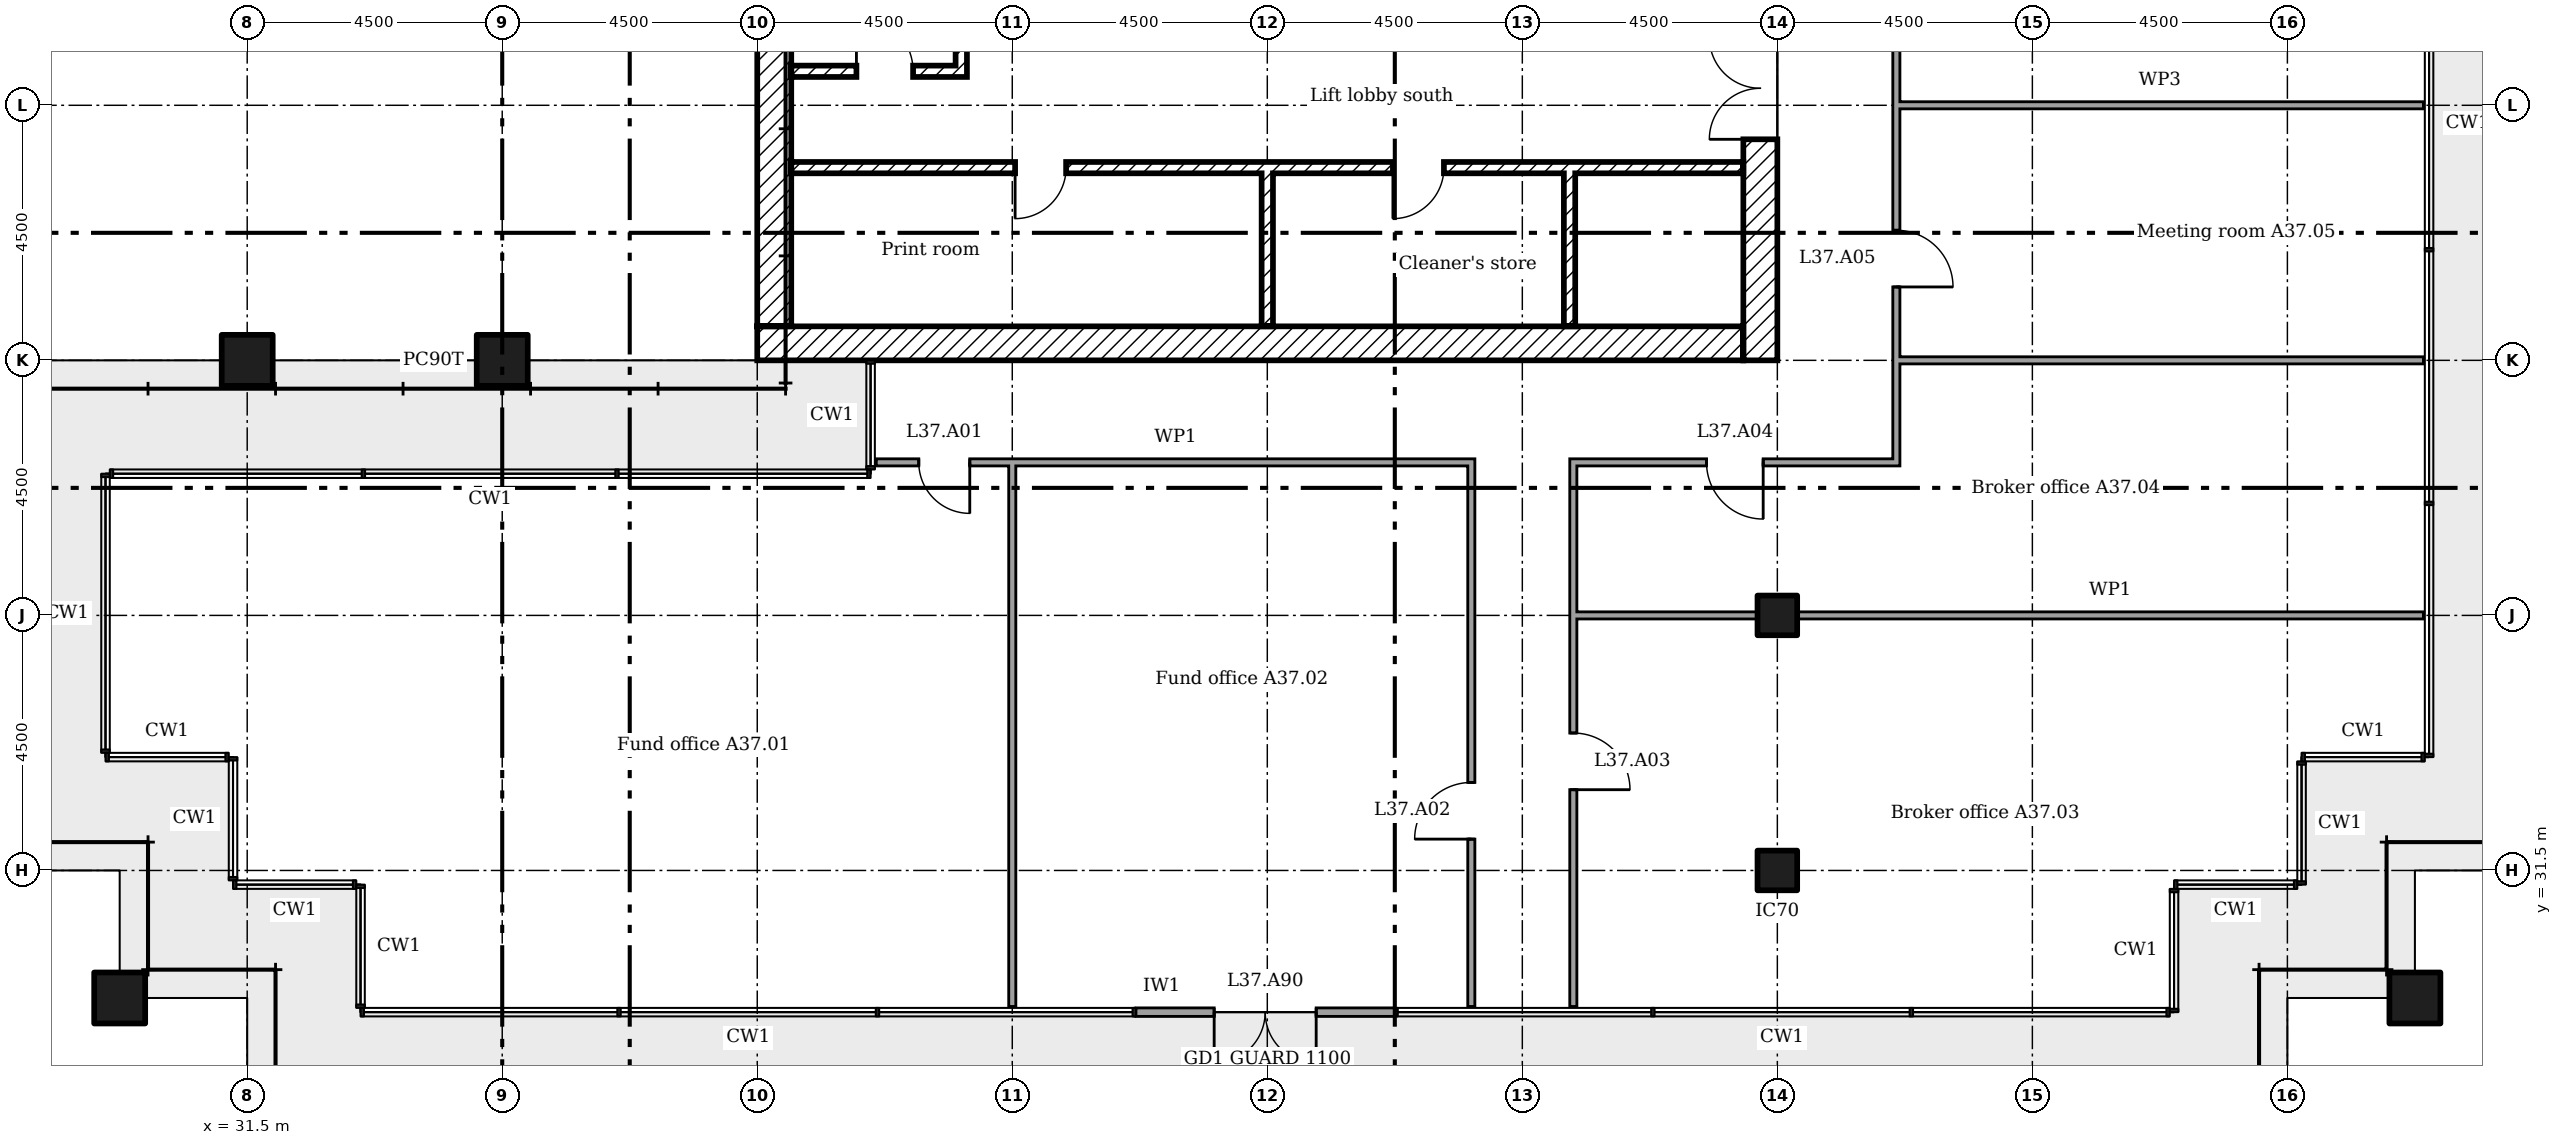
"""IFC4 building model, lengths in metres.
Left out: names, types, materials, properties, quantities, classifications, styles, units other than length and angle.
Written with IfcOpenShell. Run it as: python <this file> out.ifc"""

import sys

from ifc_helpers import new_model, si_unit, direction, frame, frame_2d, origin, origin_2d, place, context, subcontext, project, spatial, rectangle, extrude, element, fill, save


model = new_model("IFC4")
c1 = context("Model", 3, precision=1e-05, world=origin(), true_north=direction((0.0, 1.0)))
c2 = subcontext(c1, "Body", "Model", "MODEL_VIEW")
j1 = project(units=[si_unit("LENGTHUNIT", "METRE"), si_unit("PLANEANGLEUNIT", "RADIAN")], contexts=[c1])
p1 = place(None, origin())
s1 = spatial("IfcSite", under=j1, at=p1, CompositionType="ELEMENT")
p2 = place(p1, origin())
s2 = spatial("IfcBuilding", under=s1, at=p2, CompositionType="ELEMENT")
p3 = place(p2, frame((0.0, 0.0, 151.0)))
s3 = spatial("IfcBuildingStorey", under=s2, at=p3, CompositionType="ELEMENT", Elevation=151.0)
for number, where in (
    (1, (69.75, 29.25, 0.0)),
    (2, (36.0, 40.5, 0.0)),
    (3, (31.5, 40.5, 0.0)),
    (4, (29.25, 29.25, 0.0)),
):
    element("IfcColumn", number, at=place(p3, frame(where)), inside=s3, PredefinedType="COLUMN", context=c2, shape_type="SweptSolid", body=[
        extrude(rectangle(XDim=0.9, YDim=0.9, at=origin_2d()), origin(), (0.0, 0.0, 1.0), 3.6),
    ])
for number, where in (
    (5, (58.5, 31.5, 0.0)),
    (6, (58.5, 36.0, 0.0)),
):
    element("IfcColumn", number, at=place(p3, frame(where)), inside=s3, PredefinedType="COLUMN", context=c2, shape_type="SweptSolid", body=[
        extrude(rectangle(XDim=0.7, YDim=0.7, at=origin_2d()), origin(), (0.0, 0.0, 1.0), 3.6),
    ])
p4 = place(p3, frame((47.182, 29.0, 0.0)))
e7 = element("IfcWall", 7, at=p4, inside=s3, PredefinedType="SOLIDWALL", context=c2, shape_type="SweptSolid", body=[
    extrude(rectangle(XDim=4.561, YDim=0.15, at=frame_2d((2.28, 0.0))), origin(), (0.0, 0.0, 1.0), 3.45),
])
p5 = place(p4, frame((1.38, 0.0, 0.0)))
e8 = element("IfcOpeningElement", 8, at=p5, cuts=e7, PredefinedType="OPENING", context=c2, shape_type="SweptSolid", body=[
    extrude(rectangle(XDim=1.8, YDim=2.4, at=frame_2d((0.9, 1.2))), frame((0.0, 0.085, 0.0), z_axis=(0.0, -1.0, 0.0), x_axis=(1.0, 0.0, 0.0)), (0.0, 0.0, 1.0), 0.17),
])
p6 = place(p3, frame((58.2, 40.5, 0.0), z_axis=(0.0, 0.0, 1.0), x_axis=(0.0, 1.0, 0.0)))
e9 = element("IfcWall", 9, at=p6, inside=s3, PredefinedType="SHEAR", context=c2, shape_type="SweptSolid", body=[
    extrude(rectangle(XDim=18.0, YDim=0.6, at=frame_2d((9.0, 0.0))), origin(), (0.0, 0.0, 1.0), 3.35),
])
p7 = place(p6, frame((13.15, 0.0, 0.0)))
e10 = element("IfcOpeningElement", 10, at=p7, cuts=e9, PredefinedType="OPENING", context=c2, shape_type="SweptSolid", body=[
    extrude(rectangle(XDim=1.2, YDim=2.1, at=frame_2d((0.6, 1.05))), frame((0.0, 0.31, 0.0), z_axis=(0.0, -1.0, 0.0), x_axis=(1.0, 0.0, 0.0)), (0.0, 0.0, 1.0), 0.62),
])
p8 = place(p6, frame((3.9, 0.0, 0.0)))
e11 = element("IfcOpeningElement", 11, at=p8, cuts=e9, PredefinedType="OPENING", context=c2, shape_type="SweptSolid", body=[
    extrude(rectangle(XDim=1.8, YDim=2.1, at=frame_2d((0.9, 1.05))), frame((0.0, 0.31, 0.0), z_axis=(0.0, -1.0, 0.0), x_axis=(1.0, 0.0, 0.0)), (0.0, 0.0, 1.0), 0.62),
])
p9 = place(p6, frame((11.525, 0.0, 0.0)))
e12 = element("IfcOpeningElement", 12, at=p9, cuts=e9, PredefinedType="OPENING", context=c2, shape_type="SweptSolid", body=[
    extrude(rectangle(XDim=1.0, YDim=2.1, at=frame_2d((0.5, 1.05))), frame((0.0, 0.31, 0.0), z_axis=(0.0, -1.0, 0.0), x_axis=(1.0, 0.0, 0.0)), (0.0, 0.0, 1.0), 0.62),
])
p10 = place(p3, frame((40.5, 40.8, 0.0)))
e13 = element("IfcWall", 13, at=p10, inside=s3, PredefinedType="SHEAR", context=c2, shape_type="SweptSolid", body=[
    extrude(rectangle(XDim=17.4, YDim=0.6, at=frame_2d((8.7, 0.0))), origin(), (0.0, 0.0, 1.0), 3.35),
])
p11 = place(p3, frame((40.8, 41.1, 0.0), z_axis=(0.0, 0.0, 1.0), x_axis=(0.0, 1.0, 0.0)))
e14 = element("IfcWall", 14, at=p11, inside=s3, PredefinedType="SHEAR", context=c2, shape_type="SweptSolid", body=[
    extrude(rectangle(XDim=16.8, YDim=0.6, at=frame_2d((8.4, 0.0))), origin(), (0.0, 0.0, 1.0), 3.35),
])
for number, where, z_axis, x_axis in (
    (15, (49.5, 41.1, 0.0), (0.0, 0.0, 1.0), (0.0, 1.0, 0.0)),
    (16, (54.833, 41.1, 0.0), (0.0, 0.0, 1.0), (0.0, 1.0, 0.0)),
):
    element("IfcWall", number, at=place(p3, frame(where, z_axis=z_axis, x_axis=x_axis)), inside=s3, PredefinedType="SHEAR", context=c2, shape_type="SweptSolid", body=[
        extrude(rectangle(XDim=2.7, YDim=0.2, at=frame_2d((1.35, 0.0))), origin(), (0.0, 0.0, 1.0), 3.35),
    ])
p12 = place(p3, frame((41.1, 43.9, 0.0)))
e17 = element("IfcWall", 17, at=p12, inside=s3, PredefinedType="SHEAR", context=c2, shape_type="SweptSolid", body=[
    extrude(rectangle(XDim=16.8, YDim=0.2, at=frame_2d((8.4, 0.0))), origin(), (0.0, 0.0, 1.0), 3.35),
])
p13 = place(p12, frame((3.95, 0.0, 0.0)))
e18 = element("IfcOpeningElement", 18, at=p13, cuts=e17, PredefinedType="OPENING", context=c2, shape_type="SweptSolid", body=[
    extrude(rectangle(XDim=0.9, YDim=2.1, at=frame_2d((0.45, 1.05))), frame((0.0, 0.11, 0.0), z_axis=(0.0, -1.0, 0.0), x_axis=(1.0, 0.0, 0.0)), (0.0, 0.0, 1.0), 0.22),
])
p14 = place(p12, frame((10.617, 0.0, 0.0)))
e19 = element("IfcOpeningElement", 19, at=p14, cuts=e17, PredefinedType="OPENING", context=c2, shape_type="SweptSolid", body=[
    extrude(rectangle(XDim=0.9, YDim=2.1, at=frame_2d((0.45, 1.05))), frame((0.0, 0.11, 0.0), z_axis=(0.0, -1.0, 0.0), x_axis=(1.0, 0.0, 0.0)), (0.0, 0.0, 1.0), 0.22),
])
p15 = place(p3, frame((44.1, 45.5, 0.0), z_axis=(0.0, 0.0, 1.0), x_axis=(0.0, 1.0, 0.0)))
e20 = element("IfcWall", 20, at=p15, inside=s3, PredefinedType="SHEAR", context=c2, shape_type="SweptSolid", body=[
    extrude(rectangle(XDim=6.9, YDim=0.2, at=frame_2d((3.45, 0.0))), origin(), (0.0, 0.0, 1.0), 3.35),
])
p16 = place(p3, frame((41.1, 45.6, 0.0)))
e21 = element("IfcWall", 21, at=p16, inside=s3, PredefinedType="SHEAR", context=c2, shape_type="SweptSolid", body=[
    extrude(rectangle(XDim=2.9, YDim=0.2, at=frame_2d((1.45, 0.0))), origin(), (0.0, 0.0, 1.0), 3.35),
])
p17 = place(p16, frame((1.15, 0.0, 0.0)))
e22 = element("IfcOpeningElement", 22, at=p17, cuts=e21, PredefinedType="OPENING", context=c2, shape_type="SweptSolid", body=[
    extrude(rectangle(XDim=1.0, YDim=2.1, at=frame_2d((0.5, 1.05))), frame((0.0, 0.11, 0.0), z_axis=(0.0, -1.0, 0.0), x_axis=(1.0, 0.0, 0.0)), (0.0, 0.0, 1.0), 0.22),
])
p18 = place(p3, frame((54.9, 36.0, 0.0)))
e23 = element("IfcWall", 23, at=p18, inside=s3, PredefinedType="PARTITIONING", context=c2, shape_type="SweptSolid", body=[
    extrude(rectangle(XDim=3.25, YDim=0.125, at=frame_2d((1.625, 0.0))), origin(), (0.0, 0.0, 1.0), 3.45),
])
p19 = place(p3, frame((58.85, 36.0, 0.0)))
e24 = element("IfcWall", 24, at=p19, inside=s3, PredefinedType="PARTITIONING", context=c2, shape_type="SweptSolid", body=[
    extrude(rectangle(XDim=11.05, YDim=0.125, at=frame_2d((5.525, 0.0))), origin(), (0.0, 0.0, 1.0), 2.766),
])
p20 = place(p3, frame((42.6, 38.7, 0.0)))
e25 = element("IfcWall", 25, at=p20, inside=s3, PredefinedType="PARTITIONING", context=c2, shape_type="SweptSolid", body=[
    extrude(rectangle(XDim=10.562, YDim=0.125, at=frame_2d((5.281, 0.0))), origin(), (0.0, 0.0, 1.0), 3.45),
])
p21 = place(p20, frame((0.75, 0.0, 0.0)))
e26 = element("IfcOpeningElement", 26, at=p21, cuts=e25, PredefinedType="OPENING", context=c2, shape_type="SweptSolid", body=[
    extrude(rectangle(XDim=0.9, YDim=2.1, at=frame_2d((0.45, 1.05))), frame((0.0, 0.073, 0.0), z_axis=(0.0, -1.0, 0.0), x_axis=(1.0, 0.0, 0.0)), (0.0, 0.0, 1.0), 0.145),
])
p22 = place(p3, frame((54.837, 38.7, 0.0)))
e27 = element("IfcWall", 27, at=p22, inside=s3, PredefinedType="PARTITIONING", context=c2, shape_type="SweptSolid", body=[
    extrude(rectangle(XDim=5.825, YDim=0.125, at=frame_2d((2.913, 0.0))), origin(), (0.0, 0.0, 1.0), 3.45),
])
p23 = place(p22, frame((2.413, 0.0, 0.0)))
e28 = element("IfcOpeningElement", 28, at=p23, cuts=e27, PredefinedType="OPENING", context=c2, shape_type="SweptSolid", body=[
    extrude(rectangle(XDim=1.0, YDim=2.1, at=frame_2d((0.5, 1.05))), frame((0.0, 0.073, 0.0), z_axis=(0.0, -1.0, 0.0), x_axis=(1.0, 0.0, 0.0)), (0.0, 0.0, 1.0), 0.145),
])
p24 = place(p3, frame((60.6, 40.5, 0.0)))
e29 = element("IfcWall", 29, at=p24, inside=s3, PredefinedType="PARTITIONING", context=c2, shape_type="SweptSolid", body=[
    extrude(rectangle(XDim=9.3, YDim=0.125, at=frame_2d((4.65, 0.0))), origin(), (0.0, 0.0, 1.0), 2.766),
])
p25 = place(p3, frame((60.6, 45.0, 0.0)))
e30 = element("IfcWall", 30, at=p25, inside=s3, PredefinedType="MOVABLE", context=c2, shape_type="SweptSolid", body=[
    extrude(rectangle(XDim=9.3, YDim=0.125, at=frame_2d((4.65, 0.0))), origin(), (0.0, 0.0, 1.0), 2.766),
])
p26 = place(p3, frame((45.0, 29.1, 0.0), z_axis=(0.0, 0.0, 1.0), x_axis=(0.0, 1.0, 0.0)))
e31 = element("IfcWall", 31, at=p26, inside=s3, PredefinedType="PARTITIONING", context=c2, shape_type="SweptSolid", body=[
    extrude(rectangle(XDim=9.6, YDim=0.125, at=frame_2d((4.8, 0.0))), origin(), (0.0, 0.0, 1.0), 2.766),
])
p27 = place(p3, frame((53.1, 29.1, 0.0), z_axis=(0.0, 0.0, 1.0), x_axis=(0.0, 1.0, 0.0)))
e32 = element("IfcWall", 32, at=p27, inside=s3, PredefinedType="PARTITIONING", context=c2, shape_type="SweptSolid", body=[
    extrude(rectangle(XDim=9.537, YDim=0.125, at=frame_2d((4.769, 0.0))), origin(), (0.0, 0.0, 1.0), 3.45),
])
p28 = place(p27, frame((2.953, 0.0, 0.0)))
e33 = element("IfcOpeningElement", 33, at=p28, cuts=e32, PredefinedType="OPENING", context=c2, shape_type="SweptSolid", body=[
    extrude(rectangle(XDim=1.0, YDim=2.1, at=frame_2d((0.5, 1.05))), frame((0.0, 0.073, 0.0), z_axis=(0.0, -1.0, 0.0), x_axis=(1.0, 0.0, 0.0)), (0.0, 0.0, 1.0), 0.145),
])
p29 = place(p3, frame((54.9, 29.1, 0.0), z_axis=(0.0, 0.0, 1.0), x_axis=(0.0, 1.0, 0.0)))
e34 = element("IfcWall", 34, at=p29, inside=s3, PredefinedType="PARTITIONING", context=c2, shape_type="SweptSolid", body=[
    extrude(rectangle(XDim=9.537, YDim=0.125, at=frame_2d((4.769, 0.0))), origin(), (0.0, 0.0, 1.0), 3.45),
])
p30 = place(p29, frame((3.825, 0.0, 0.0)))
e35 = element("IfcOpeningElement", 35, at=p30, cuts=e34, PredefinedType="OPENING", context=c2, shape_type="SweptSolid", body=[
    extrude(rectangle(XDim=1.0, YDim=2.1, at=frame_2d((0.5, 1.05))), frame((0.0, 0.073, 0.0), z_axis=(0.0, -1.0, 0.0), x_axis=(1.0, 0.0, 0.0)), (0.0, 0.0, 1.0), 0.145),
])
p31 = place(p3, frame((60.6, 38.762, 0.0), z_axis=(0.0, 0.0, 1.0), x_axis=(0.0, 1.0, 0.0)))
e36 = element("IfcWall", 36, at=p31, inside=s3, PredefinedType="PARTITIONING", context=c2, shape_type="SweptSolid", body=[
    extrude(rectangle(XDim=22.075, YDim=0.125, at=frame_2d((11.038, 0.0))), origin(), (0.0, 0.0, 1.0), 3.45),
])
p32 = place(p31, frame((3.032, 0.0, 0.0)))
e37 = element("IfcOpeningElement", 37, at=p32, cuts=e36, PredefinedType="OPENING", context=c2, shape_type="SweptSolid", body=[
    extrude(rectangle(XDim=1.0, YDim=2.1, at=frame_2d((0.5, 1.05))), frame((0.0, 0.073, 0.0), z_axis=(0.0, -1.0, 0.0), x_axis=(1.0, 0.0, 0.0)), (0.0, 0.0, 1.0), 0.145),
])
p33 = place(p31, frame((8.442, 0.0, 0.0)))
e38 = element("IfcOpeningElement", 38, at=p33, cuts=e36, PredefinedType="OPENING", context=c2, shape_type="SweptSolid", body=[
    extrude(rectangle(XDim=1.0, YDim=2.1, at=frame_2d((0.5, 1.05))), frame((0.0, 0.073, 0.0), z_axis=(0.0, -1.0, 0.0), x_axis=(1.0, 0.0, 0.0)), (0.0, 0.0, 1.0), 0.145),
])
p34 = place(p31, frame((12.488, 0.0, 0.0)))
e39 = element("IfcOpeningElement", 39, at=p34, cuts=e36, PredefinedType="OPENING", context=c2, shape_type="SweptSolid", body=[
    extrude(rectangle(XDim=1.0, YDim=2.1, at=frame_2d((0.5, 1.05))), frame((0.0, 0.073, 0.0), z_axis=(0.0, -1.0, 0.0), x_axis=(1.0, 0.0, 0.0)), (0.0, 0.0, 1.0), 0.145),
])
p35 = place(p31, frame((16.532, 0.0, 0.0)))
e40 = element("IfcOpeningElement", 40, at=p35, cuts=e36, PredefinedType="OPENING", context=c2, shape_type="SweptSolid", body=[
    extrude(rectangle(XDim=1.0, YDim=2.1, at=frame_2d((0.5, 1.05))), frame((0.0, 0.073, 0.0), z_axis=(0.0, -1.0, 0.0), x_axis=(1.0, 0.0, 0.0)), (0.0, 0.0, 1.0), 0.145),
])
p36 = place(p31, frame((20.663, 0.0, 0.0)))
e41 = element("IfcOpeningElement", 41, at=p36, cuts=e36, PredefinedType="OPENING", context=c2, shape_type="SweptSolid", body=[
    extrude(rectangle(XDim=0.9, YDim=2.1, at=frame_2d((0.45, 1.05))), frame((0.0, 0.073, 0.0), z_axis=(0.0, -1.0, 0.0), x_axis=(1.0, 0.0, 0.0)), (0.0, 0.0, 1.0), 0.145),
])
p37 = place(p5, frame((1.8, 0.0, 0.0), x_axis=(-1.0, 0.0, 0.0)))
e42 = element("IfcDoor", 42, at=p37, inside=s3, OperationType="DOUBLE_DOOR_DOUBLE_SWING", PredefinedType="NOTDEFINED", context=c2, shape_type="SweptSolid", body=[
    extrude(rectangle(XDim=1.8, YDim=2.4, at=frame_2d((0.9, 1.2))), frame((0.0, 0.025, 0.0), z_axis=(0.0, -1.0, 0.0), x_axis=(1.0, 0.0, 0.0)), (0.0, 0.0, 1.0), 0.05),
])
fill(e8, e42)
p38 = place(p8, origin())
e43 = element("IfcDoor", 43, at=p38, inside=s3, OperationType="DOUBLE_DOOR_SINGLE_SWING", PredefinedType="DOOR", context=c2, shape_type="SweptSolid", body=[
    extrude(rectangle(XDim=1.8, YDim=2.1, at=frame_2d((0.9, 1.05))), frame((0.0, 0.025, 0.0), z_axis=(0.0, -1.0, 0.0), x_axis=(1.0, 0.0, 0.0)), (0.0, 0.0, 1.0), 0.05),
])
fill(e11, e43)
p39 = place(p17, origin())
e44 = element("IfcDoor", 44, at=p39, inside=s3, OperationType="SINGLE_SWING_RIGHT", PredefinedType="DOOR", context=c2, shape_type="SweptSolid", body=[
    extrude(rectangle(XDim=1.0, YDim=2.1, at=frame_2d((0.5, 1.05))), frame((0.0, 0.025, 0.0), z_axis=(0.0, -1.0, 0.0), x_axis=(1.0, 0.0, 0.0)), (0.0, 0.0, 1.0), 0.05),
])
fill(e22, e44)
p40 = place(p13, frame((0.9, 0.0, 0.0), x_axis=(-1.0, 0.0, 0.0)))
e45 = element("IfcDoor", 45, at=p40, inside=s3, OperationType="SINGLE_SWING_LEFT", PredefinedType="DOOR", context=c2, shape_type="SweptSolid", body=[
    extrude(rectangle(XDim=0.9, YDim=2.1, at=frame_2d((0.45, 1.05))), frame((0.0, 0.025, 0.0), z_axis=(0.0, -1.0, 0.0), x_axis=(1.0, 0.0, 0.0)), (0.0, 0.0, 1.0), 0.05),
])
fill(e18, e45)
p41 = place(p14, frame((0.9, 0.0, 0.0), x_axis=(-1.0, 0.0, 0.0)))
e46 = element("IfcDoor", 46, at=p41, inside=s3, OperationType="SINGLE_SWING_LEFT", PredefinedType="DOOR", context=c2, shape_type="SweptSolid", body=[
    extrude(rectangle(XDim=0.9, YDim=2.1, at=frame_2d((0.45, 1.05))), frame((0.0, 0.025, 0.0), z_axis=(0.0, -1.0, 0.0), x_axis=(1.0, 0.0, 0.0)), (0.0, 0.0, 1.0), 0.05),
])
fill(e19, e46)
p42 = place(p21, frame((0.9, 0.0, 0.0), x_axis=(-1.0, 0.0, 0.0)))
e47 = element("IfcDoor", 47, at=p42, inside=s3, OperationType="SINGLE_SWING_RIGHT", PredefinedType="DOOR", context=c2, shape_type="SweptSolid", body=[
    extrude(rectangle(XDim=0.9, YDim=2.1, at=frame_2d((0.45, 1.05))), frame((0.0, 0.025, 0.0), z_axis=(0.0, -1.0, 0.0), x_axis=(1.0, 0.0, 0.0)), (0.0, 0.0, 1.0), 0.05),
])
fill(e26, e47)
p43 = place(p28, origin())
e48 = element("IfcDoor", 48, at=p43, inside=s3, OperationType="SINGLE_SWING_RIGHT", PredefinedType="DOOR", context=c2, shape_type="SweptSolid", body=[
    extrude(rectangle(XDim=1.0, YDim=2.1, at=frame_2d((0.5, 1.05))), frame((0.0, 0.025, 0.0), z_axis=(0.0, -1.0, 0.0), x_axis=(1.0, 0.0, 0.0)), (0.0, 0.0, 1.0), 0.05),
])
fill(e33, e48)
p44 = place(p30, frame((1.0, 0.0, 0.0), x_axis=(-1.0, 0.0, 0.0)))
e49 = element("IfcDoor", 49, at=p44, inside=s3, OperationType="SINGLE_SWING_LEFT", PredefinedType="DOOR", context=c2, shape_type="SweptSolid", body=[
    extrude(rectangle(XDim=1.0, YDim=2.1, at=frame_2d((0.5, 1.05))), frame((0.0, 0.025, 0.0), z_axis=(0.0, -1.0, 0.0), x_axis=(1.0, 0.0, 0.0)), (0.0, 0.0, 1.0), 0.05),
])
fill(e35, e49)
p45 = place(p23, frame((1.0, 0.0, 0.0), x_axis=(-1.0, 0.0, 0.0)))
e50 = element("IfcDoor", 50, at=p45, inside=s3, OperationType="SINGLE_SWING_RIGHT", PredefinedType="DOOR", context=c2, shape_type="SweptSolid", body=[
    extrude(rectangle(XDim=1.0, YDim=2.1, at=frame_2d((0.5, 1.05))), frame((0.0, 0.025, 0.0), z_axis=(0.0, -1.0, 0.0), x_axis=(1.0, 0.0, 0.0)), (0.0, 0.0, 1.0), 0.05),
])
fill(e28, e50)
p46 = place(p32, frame((1.0, 0.0, 0.0), x_axis=(-1.0, 0.0, 0.0)))
e51 = element("IfcDoor", 51, at=p46, inside=s3, OperationType="SINGLE_SWING_LEFT", PredefinedType="DOOR", context=c2, shape_type="SweptSolid", body=[
    extrude(rectangle(XDim=1.0, YDim=2.1, at=frame_2d((0.5, 1.05))), frame((0.0, 0.025, 0.0), z_axis=(0.0, -1.0, 0.0), x_axis=(1.0, 0.0, 0.0)), (0.0, 0.0, 1.0), 0.05),
])
fill(e37, e51)
save(model, sys.argv[1])
